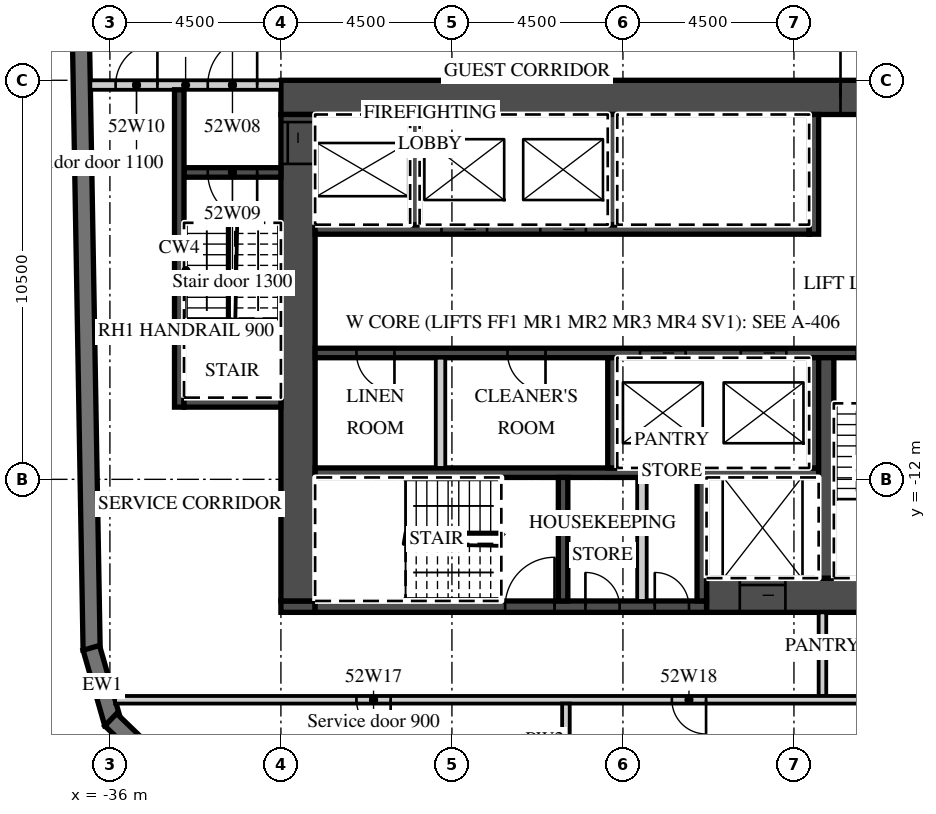
"""IFC4 building model, lengths in metres.
Left out: names, types, materials, properties, quantities, classifications, styles, units other than length and angle.
Written with IfcOpenShell. Run it as: python <this file> out.ifc"""

import sys

from ifc_helpers import new_model, si_unit, direction, frame, frame_2d, origin, place, context, subcontext, project, spatial, polyline, rectangle, outline, extrude, element, fill, save


model = new_model("IFC4")
c1 = context("Model", 3, precision=1e-05, world=origin(), true_north=direction((0.0, 1.0)))
c2 = subcontext(c1, "Body", "Model", "MODEL_VIEW")
j1 = project(units=[si_unit("LENGTHUNIT", "METRE"), si_unit("PLANEANGLEUNIT", "RADIAN")], contexts=[c1])
p1 = place(None, origin())
s1 = spatial("IfcSite", under=j1, at=p1, CompositionType="ELEMENT")
p2 = place(p1, origin())
s2 = spatial("IfcBuilding", under=s1, at=p2, CompositionType="ELEMENT")
p3 = place(p2, frame((0.0, 0.0, 217.7)))
s3 = spatial("IfcBuildingStorey", under=s2, at=p3, CompositionType="ELEMENT", Elevation=217.7)
p4 = place(p3, frame((-37.057, 16.503, 0.0), z_axis=(0.0, 0.0, 1.0), x_axis=(0.017452279857, -0.999847697366, 0.0)))
e1 = element("IfcWall", 1, at=p4, inside=s3, PredefinedType="SOLIDWALL", context=c2, shape_type="SweptSolid", body=[
    extrude(rectangle(XDim=33.0, YDim=0.45, at=frame_2d((16.5, 0.0))), origin(), (0.0, 0.0, 1.0), 3.02),
])
p5 = place(p3, frame((-36.49, -16.434, 0.0), z_axis=(0.0, 0.0, 1.0), x_axis=(0.275577603096, -0.961278827745, 0.0)))
e2 = element("IfcWall", 2, at=p5, inside=s3, PredefinedType="SOLIDWALL", context=c2, shape_type="SweptSolid", body=[
    extrude(outline(polyline([(0.0, -0.225), (2.071, -0.225), (1.95, 0.225), (0.121, 0.225), (0.0, -0.225)])), origin(), (0.0, 0.0, 1.0), 3.02),
])
p6 = place(p3, frame((-35.979, -18.324, 0.0), z_axis=(0.0, 0.0, 1.0), x_axis=(0.719320193998, -0.694678672846, 0.0)))
e3 = element("IfcWall", 3, at=p6, inside=s3, PredefinedType="SOLIDWALL", context=c2, shape_type="SweptSolid", body=[
    extrude(outline(polyline([(0.0, -0.225), (2.071, -0.225), (1.95, 0.225), (0.121, 0.225), (0.0, -0.225)])), origin(), (0.0, 0.0, 1.0), 3.02),
])
p7 = place(p3, frame((-31.5, -1.95, 0.0), z_axis=(0.0, 0.0, 1.0), x_axis=(1.0, 0.0, 0.0)))
e4 = element("IfcWall", 4, at=p7, inside=s3, PredefinedType="SHEAR", context=c2, shape_type="SweptSolid", body=[
    extrude(rectangle(XDim=18.0, YDim=0.9, at=frame_2d((9.0, 0.0))), origin(), (0.0, 0.0, 1.0), 3.02),
])
p8 = place(p7, frame((14.725, 0.0, 0.0)))
e5 = element("IfcOpeningElement", 5, at=p8, cuts=e4, PredefinedType="OPENING", context=c2, shape_type="SweptSolid", body=[
    extrude(rectangle(XDim=1.8, YDim=2.1, at=frame_2d((0.9, 1.05))), frame((0.0, 0.46, 0.0), z_axis=(0.0, -1.0, 0.0), x_axis=(1.0, 0.0, 0.0)), (0.0, 0.0, 1.0), 0.92),
])
p9 = place(p3, frame((-20.3, -15.05, 0.0), z_axis=(0.0, 0.0, 1.0), x_axis=(1.0, 0.0, 0.0)))
e6 = element("IfcWall", 6, at=p9, inside=s3, PredefinedType="SHEAR", context=c2, shape_type="SweptSolid", body=[
    extrude(rectangle(XDim=6.8, YDim=0.9, at=frame_2d((3.4, 0.0))), origin(), (0.0, 0.0, 1.0), 3.02),
])
p10 = place(p9, frame((0.875, 0.0, 0.0)))
e7 = element("IfcOpeningElement", 7, at=p10, cuts=e6, PredefinedType="OPENING", context=c2, shape_type="SweptSolid", body=[
    extrude(rectangle(XDim=1.2, YDim=2.1, at=frame_2d((0.6, 1.05))), frame((0.0, 0.46, 0.0), z_axis=(0.0, -1.0, 0.0), x_axis=(1.0, 0.0, 0.0)), (0.0, 0.0, 1.0), 0.92),
])
p11 = place(p3, frame((-31.5, -15.35, 0.0), z_axis=(0.0, 0.0, 1.0), x_axis=(1.0, 0.0, 0.0)))
e8 = element("IfcWall", 8, at=p11, inside=s3, PredefinedType="SHEAR", context=c2, shape_type="SweptSolid", body=[
    extrude(rectangle(XDim=0.9, YDim=0.3, at=frame_2d((0.45, 0.0))), origin(), (0.0, 0.0, 1.0), 3.02),
])
p12 = place(p3, frame((-30.6, -15.35, 0.0), z_axis=(0.0, 0.0, 1.0), x_axis=(1.0, 0.0, 0.0)))
e9 = element("IfcWall", 9, at=p12, inside=s3, PredefinedType="SHEAR", context=c2, shape_type="SweptSolid", body=[
    extrude(rectangle(XDim=10.3, YDim=0.3, at=frame_2d((5.15, 0.0))), origin(), (0.0, 0.0, 1.0), 3.02),
])
p13 = place(p12, frame((5.0, 0.0, 0.0)))
e10 = element("IfcOpeningElement", 10, at=p13, cuts=e9, PredefinedType="OPENING", context=c2, shape_type="SweptSolid", body=[
    extrude(rectangle(XDim=1.3, YDim=2.1, at=frame_2d((0.65, 1.05))), frame((0.0, 0.16, 0.0), z_axis=(0.0, -1.0, 0.0), x_axis=(1.0, 0.0, 0.0)), (0.0, 0.0, 1.0), 0.32),
])
p14 = place(p12, frame((7.113, 0.0, 0.0)))
e11 = element("IfcOpeningElement", 11, at=p14, cuts=e9, PredefinedType="OPENING", context=c2, shape_type="SweptSolid", body=[
    extrude(rectangle(XDim=0.9, YDim=2.1, at=frame_2d((0.45, 1.05))), frame((0.0, 0.16, 0.0), z_axis=(0.0, -1.0, 0.0), x_axis=(1.0, 0.0, 0.0)), (0.0, 0.0, 1.0), 0.32),
])
p15 = place(p12, frame((8.938, 0.0, 0.0)))
e12 = element("IfcOpeningElement", 12, at=p15, cuts=e9, PredefinedType="OPENING", context=c2, shape_type="SweptSolid", body=[
    extrude(rectangle(XDim=0.9, YDim=2.1, at=frame_2d((0.45, 1.05))), frame((0.0, 0.16, 0.0), z_axis=(0.0, -1.0, 0.0), x_axis=(1.0, 0.0, 0.0)), (0.0, 0.0, 1.0), 0.32),
])
p16 = place(p3, frame((-31.05, -15.2, 0.0), z_axis=(0.0, 0.0, 1.0), x_axis=(0.0, 1.0, 0.0)))
e13 = element("IfcWall", 13, at=p16, inside=s3, PredefinedType="SHEAR", context=c2, shape_type="SweptSolid", body=[
    extrude(rectangle(XDim=12.8, YDim=0.9, at=frame_2d((6.4, 0.0))), origin(), (0.0, 0.0, 1.0), 3.02),
])
p17 = place(p16, frame((11.5, 0.0, 0.0)))
e14 = element("IfcOpeningElement", 14, at=p17, cuts=e13, PredefinedType="OPENING", context=c2, shape_type="SweptSolid", body=[
    extrude(rectangle(XDim=1.1, YDim=2.1, at=frame_2d((0.55, 1.05))), frame((0.0, 0.46, 0.0), z_axis=(0.0, -1.0, 0.0), x_axis=(1.0, 0.0, 0.0)), (0.0, 0.0, 1.0), 0.92),
])
p18 = place(p3, frame((-30.6, -5.425, 0.0), z_axis=(0.0, 0.0, 1.0), x_axis=(1.0, 0.0, 0.0)))
e15 = element("IfcWall", 15, at=p18, inside=s3, PredefinedType="SHEAR", context=c2, shape_type="SweptSolid", body=[
    extrude(rectangle(XDim=13.0, YDim=0.25, at=frame_2d((6.5, 0.0))), origin(), (0.0, 0.0, 1.0), 3.02),
])
p19 = place(p18, frame((3.325, 0.0, 0.0)))
e16 = element("IfcOpeningElement", 16, at=p19, cuts=e15, PredefinedType="OPENING", context=c2, shape_type="SweptSolid", body=[
    extrude(rectangle(XDim=1.2, YDim=2.1, at=frame_2d((0.6, 1.05))), frame((0.0, 0.135, 0.0), z_axis=(0.0, -1.0, 0.0), x_axis=(1.0, 0.0, 0.0)), (0.0, 0.0, 1.0), 0.27),
])
p20 = place(p18, frame((5.925, 0.0, 0.0)))
e17 = element("IfcOpeningElement", 17, at=p20, cuts=e15, PredefinedType="OPENING", context=c2, shape_type="SweptSolid", body=[
    extrude(rectangle(XDim=1.2, YDim=2.1, at=frame_2d((0.6, 1.05))), frame((0.0, 0.135, 0.0), z_axis=(0.0, -1.0, 0.0), x_axis=(1.0, 0.0, 0.0)), (0.0, 0.0, 1.0), 0.27),
])
p21 = place(p3, frame((-17.475, -5.55, 0.0), z_axis=(0.0, 0.0, 1.0), x_axis=(0.0, 1.0, 0.0)))
e18 = element("IfcWall", 18, at=p21, inside=s3, PredefinedType="SHEAR", context=c2, shape_type="SweptSolid", body=[
    extrude(rectangle(XDim=3.15, YDim=0.25, at=frame_2d((1.575, 0.0))), origin(), (0.0, 0.0, 1.0), 3.02),
])
for number, where, z_axis, x_axis in (
    (19, (-27.975, -5.3, 0.0), (0.0, 0.0, 1.0), (0.0, 1.0, 0.0)),
    (20, (-22.775, -5.3, 0.0), (0.0, 0.0, 1.0), (0.0, 1.0, 0.0)),
):
    element("IfcWall", number, at=place(p3, frame(where, z_axis=z_axis, x_axis=x_axis)), inside=s3, PredefinedType="SHEAR", context=c2, shape_type="SweptSolid", body=[
        extrude(rectangle(XDim=2.9, YDim=0.25, at=frame_2d((1.45, 0.0))), origin(), (0.0, 0.0, 1.0), 3.02),
    ])
p22 = place(p3, frame((-30.6, -8.675, 0.0), z_axis=(0.0, 0.0, 1.0), x_axis=(1.0, 0.0, 0.0)))
e21 = element("IfcWall", 21, at=p22, inside=s3, PredefinedType="SHEAR", context=c2, shape_type="SweptSolid", body=[
    extrude(rectangle(XDim=16.2, YDim=0.25, at=frame_2d((8.1, 0.0))), origin(), (0.0, 0.0, 1.0), 3.02),
])
p23 = place(p22, frame((8.55, 0.0, 0.0)))
e22 = element("IfcOpeningElement", 22, at=p23, cuts=e21, PredefinedType="OPENING", context=c2, shape_type="SweptSolid", body=[
    extrude(rectangle(XDim=1.2, YDim=2.1, at=frame_2d((0.6, 1.05))), frame((0.0, 0.135, 0.0), z_axis=(0.0, -1.0, 0.0), x_axis=(1.0, 0.0, 0.0)), (0.0, 0.0, 1.0), 0.27),
])
p24 = place(p22, frame((11.2, 0.0, 0.0)))
e23 = element("IfcOpeningElement", 23, at=p24, cuts=e21, PredefinedType="OPENING", context=c2, shape_type="SweptSolid", body=[
    extrude(rectangle(XDim=1.2, YDim=2.1, at=frame_2d((0.6, 1.05))), frame((0.0, 0.135, 0.0), z_axis=(0.0, -1.0, 0.0), x_axis=(1.0, 0.0, 0.0)), (0.0, 0.0, 1.0), 0.27),
])
p25 = place(p22, frame((14.25, 0.0, 0.0)))
e24 = element("IfcOpeningElement", 24, at=p25, cuts=e21, PredefinedType="OPENING", context=c2, shape_type="SweptSolid", body=[
    extrude(rectangle(XDim=1.3, YDim=2.1, at=frame_2d((0.65, 1.05))), frame((0.0, 0.135, 0.0), z_axis=(0.0, -1.0, 0.0), x_axis=(1.0, 0.0, 0.0)), (0.0, 0.0, 1.0), 0.27),
])
p26 = place(p22, frame((1.087, 0.0, 0.0)))
e25 = element("IfcOpeningElement", 25, at=p26, cuts=e21, PredefinedType="OPENING", context=c2, shape_type="SweptSolid", body=[
    extrude(rectangle(XDim=1.0, YDim=2.1, at=frame_2d((0.5, 1.05))), frame((0.0, 0.135, 0.0), z_axis=(0.0, -1.0, 0.0), x_axis=(1.0, 0.0, 0.0)), (0.0, 0.0, 1.0), 0.27),
])
p27 = place(p22, frame((5.062, 0.0, 0.0)))
e26 = element("IfcOpeningElement", 26, at=p27, cuts=e21, PredefinedType="OPENING", context=c2, shape_type="SweptSolid", body=[
    extrude(rectangle(XDim=1.0, YDim=2.1, at=frame_2d((0.5, 1.05))), frame((0.0, 0.135, 0.0), z_axis=(0.0, -1.0, 0.0), x_axis=(1.0, 0.0, 0.0)), (0.0, 0.0, 1.0), 0.27),
])
p28 = place(p3, frame((-30.6, -11.825, 0.0), z_axis=(0.0, 0.0, 1.0), x_axis=(1.0, 0.0, 0.0)))
e27 = element("IfcWall", 27, at=p28, inside=s3, PredefinedType="SHEAR", context=c2, shape_type="SweptSolid", body=[
    extrude(rectangle(XDim=13.25, YDim=0.25, at=frame_2d((6.625, 0.0))), origin(), (0.0, 0.0, 1.0), 3.02),
])
for number, where, z_axis, x_axis in (
    (28, (-17.475, -11.7, 0.0), (0.0, 0.0, 1.0), (0.0, 1.0, 0.0)),
    (29, (-22.775, -11.7, 0.0), (0.0, 0.0, 1.0), (0.0, 1.0, 0.0)),
):
    element("IfcWall", number, at=place(p3, frame(where, z_axis=z_axis, x_axis=x_axis)), inside=s3, PredefinedType="SHEAR", context=c2, shape_type="SweptSolid", body=[
        extrude(rectangle(XDim=2.9, YDim=0.25, at=frame_2d((1.45, 0.0))), origin(), (0.0, 0.0, 1.0), 3.02),
    ])
p29 = place(p3, frame((-27.3, -11.7, 0.0), z_axis=(0.0, 0.0, 1.0), x_axis=(0.0, 1.0, 0.0)))
e30 = element("IfcWall", 30, at=p29, inside=s3, PredefinedType="PARTITIONING", context=c2, shape_type="SweptSolid", body=[
    extrude(rectangle(XDim=2.9, YDim=0.25, at=frame_2d((1.45, 0.0))), origin(), (0.0, 0.0, 1.0), 3.02),
])
p30 = place(p3, frame((-17.15, -14.6, 0.0), z_axis=(0.0, 0.0, 1.0), x_axis=(0.0, 1.0, 0.0)))
e31 = element("IfcWall", 31, at=p30, inside=s3, PredefinedType="SHEAR", context=c2, shape_type="SweptSolid", body=[
    extrude(rectangle(XDim=5.8, YDim=0.4, at=frame_2d((2.9, 0.0))), origin(), (0.0, 0.0, 1.0), 3.02),
])
for number, where, z_axis, x_axis in (
    (32, (-20.425, -15.2, 0.0), (0.0, 0.0, 1.0), (0.0, 1.0, 0.0)),
    (33, (-24.075, -15.2, 0.0), (0.0, 0.0, 1.0), (0.0, 1.0, 0.0)),
):
    element("IfcWall", number, at=place(p3, frame(where, z_axis=z_axis, x_axis=x_axis)), inside=s3, PredefinedType="SHEAR", context=c2, shape_type="SweptSolid", body=[
        extrude(rectangle(XDim=3.25, YDim=0.25, at=frame_2d((1.625, 0.0))), origin(), (0.0, 0.0, 1.0), 3.02),
    ])
p31 = place(p3, frame((-22.0, -15.2, 0.0), z_axis=(0.0, 0.0, 1.0), x_axis=(0.0, 1.0, 0.0)))
e34 = element("IfcWall", 34, at=p31, inside=s3, PredefinedType="PARTITIONING", context=c2, shape_type="SweptSolid", body=[
    extrude(rectangle(XDim=3.25, YDim=0.25, at=frame_2d((1.625, 0.0))), origin(), (0.0, 0.0, 1.0), 3.02),
])
p32 = place(p3, frame((-36.515, -1.625, 0.0), z_axis=(0.0, 0.0, 1.0), x_axis=(1.0, 0.0, 0.0)))
e35 = element("IfcWall", 35, at=p32, inside=s3, PredefinedType="PARTITIONING", context=c2, shape_type="SweptSolid", body=[
    extrude(rectangle(XDim=5.015, YDim=0.25, at=frame_2d((2.508, 0.0))), origin(), (0.0, 0.0, 1.0), 3.02),
])
p33 = place(p32, frame((3.09, 0.0, 0.0)))
e36 = element("IfcOpeningElement", 36, at=p33, cuts=e35, PredefinedType="OPENING", context=c2, shape_type="SweptSolid", body=[
    extrude(rectangle(XDim=1.3, YDim=2.1, at=frame_2d((0.65, 1.05))), frame((0.0, 0.135, 0.0), z_axis=(0.0, -1.0, 0.0), x_axis=(1.0, 0.0, 0.0)), (0.0, 0.0, 1.0), 0.27),
])
p34 = place(p32, frame((0.665, 0.0, 0.0)))
e37 = element("IfcOpeningElement", 37, at=p34, cuts=e35, PredefinedType="OPENING", context=c2, shape_type="SweptSolid", body=[
    extrude(rectangle(XDim=1.1, YDim=2.1, at=frame_2d((0.55, 1.05))), frame((0.0, 0.135, 0.0), z_axis=(0.0, -1.0, 0.0), x_axis=(1.0, 0.0, 0.0)), (0.0, 0.0, 1.0), 0.27),
])
p35 = place(p3, frame((-34.05, -3.925, 0.0), z_axis=(0.0, 0.0, 1.0), x_axis=(1.0, 0.0, 0.0)))
e38 = element("IfcWall", 38, at=p35, inside=s3, PredefinedType="SHEAR", context=c2, shape_type="SweptSolid", body=[
    extrude(rectangle(XDim=2.55, YDim=0.25, at=frame_2d((1.275, 0.0))), origin(), (0.0, 0.0, 1.0), 3.02),
])
p36 = place(p35, frame((0.625, 0.0, 0.0)))
e39 = element("IfcOpeningElement", 39, at=p36, cuts=e38, PredefinedType="OPENING", context=c2, shape_type="SweptSolid", body=[
    extrude(rectangle(XDim=1.3, YDim=2.1, at=frame_2d((0.65, 1.05))), frame((0.0, 0.135, 0.0), z_axis=(0.0, -1.0, 0.0), x_axis=(1.0, 0.0, 0.0)), (0.0, 0.0, 1.0), 0.27),
])
p37 = place(p3, frame((-34.175, -10.1, 0.0), z_axis=(0.0, 0.0, 1.0), x_axis=(0.0, 1.0, 0.0)))
e40 = element("IfcWall", 40, at=p37, inside=s3, PredefinedType="SHEAR", context=c2, shape_type="SweptSolid", body=[
    extrude(rectangle(XDim=8.35, YDim=0.25, at=frame_2d((4.175, 0.0))), origin(), (0.0, 0.0, 1.0), 3.02),
])
p38 = place(p3, frame((-34.05, -9.975, 0.0), z_axis=(0.0, 0.0, 1.0), x_axis=(1.0, 0.0, 0.0)))
e41 = element("IfcWall", 41, at=p38, inside=s3, PredefinedType="SHEAR", context=c2, shape_type="SweptSolid", body=[
    extrude(rectangle(XDim=2.55, YDim=0.25, at=frame_2d((1.275, 0.0))), origin(), (0.0, 0.0, 1.0), 3.02),
])
p39 = place(p3, frame((-17.25, -17.7, 0.0), z_axis=(0.0, 0.0, 1.0), x_axis=(0.0, 1.0, 0.0)))
e42 = element("IfcWall", 42, at=p39, inside=s3, PredefinedType="PARTITIONING", context=c2, shape_type="SweptSolid", body=[
    extrude(rectangle(XDim=2.2, YDim=0.2, at=frame_2d((1.1, 0.0))), origin(), (0.0, 0.0, 1.0), 3.02),
])
p40 = place(p3, frame((-35.864, -17.8, 0.0), z_axis=(0.0, 0.0, 1.0), x_axis=(1.0, 0.0, 0.0)))
e43 = element("IfcWall", 43, at=p40, inside=s3, PredefinedType="PARTITIONING", context=c2, shape_type="SweptSolid", body=[
    extrude(rectangle(XDim=22.264, YDim=0.2, at=frame_2d((11.132, 0.0))), origin(), (0.0, 0.0, 1.0), 3.02),
])
p41 = place(p40, frame((6.351, 0.0, 0.0)))
e44 = element("IfcOpeningElement", 44, at=p41, cuts=e43, PredefinedType="OPENING", context=c2, shape_type="SweptSolid", body=[
    extrude(rectangle(XDim=0.9, YDim=2.1, at=frame_2d((0.45, 1.05))), frame((0.0, 0.11, 0.0), z_axis=(0.0, -1.0, 0.0), x_axis=(1.0, 0.0, 0.0)), (0.0, 0.0, 1.0), 0.22),
])
p42 = place(p40, frame((14.651, 0.0, 0.0)))
e45 = element("IfcOpeningElement", 45, at=p42, cuts=e43, PredefinedType="OPENING", context=c2, shape_type="SweptSolid", body=[
    extrude(rectangle(XDim=0.9, YDim=2.1, at=frame_2d((0.45, 1.05))), frame((0.0, 0.11, 0.0), z_axis=(0.0, -1.0, 0.0), x_axis=(1.0, 0.0, 0.0)), (0.0, 0.0, 1.0), 0.22),
])
p43 = place(p3, frame((-24.0, -19.824, 0.0), z_axis=(0.0, 0.0, 1.0), x_axis=(0.0, 1.0, 0.0)))
e46 = element("IfcWall", 46, at=p43, inside=s3, PredefinedType="PARTITIONING", context=c2, shape_type="SweptSolid", body=[
    extrude(rectangle(XDim=1.925, YDim=0.2, at=frame_2d((0.962, 0.0))), origin(), (0.0, 0.0, 1.0), 3.02),
])
p44 = place(p23, origin())
e47 = element("IfcDoor", 47, at=p44, inside=s3, OperationType="SLIDING_TO_LEFT", PredefinedType="DOOR", context=c2, shape_type="SweptSolid", body=[
    extrude(rectangle(XDim=1.2, YDim=2.1, at=frame_2d((0.6, 1.05))), frame((0.0, 0.025, 0.0), z_axis=(0.0, -1.0, 0.0), x_axis=(1.0, 0.0, 0.0)), (0.0, 0.0, 1.0), 0.05),
])
fill(e22, e47)
p45 = place(p24, origin())
e48 = element("IfcDoor", 48, at=p45, inside=s3, OperationType="SLIDING_TO_RIGHT", PredefinedType="DOOR", context=c2, shape_type="SweptSolid", body=[
    extrude(rectangle(XDim=1.2, YDim=2.1, at=frame_2d((0.6, 1.05))), frame((0.0, 0.025, 0.0), z_axis=(0.0, -1.0, 0.0), x_axis=(1.0, 0.0, 0.0)), (0.0, 0.0, 1.0), 0.05),
])
fill(e23, e48)
p46 = place(p19, origin())
e49 = element("IfcDoor", 49, at=p46, inside=s3, OperationType="SLIDING_TO_RIGHT", PredefinedType="DOOR", context=c2, shape_type="SweptSolid", body=[
    extrude(rectangle(XDim=1.2, YDim=2.1, at=frame_2d((0.6, 1.05))), frame((0.0, 0.025, 0.0), z_axis=(0.0, -1.0, 0.0), x_axis=(1.0, 0.0, 0.0)), (0.0, 0.0, 1.0), 0.05),
])
fill(e16, e49)
p47 = place(p20, origin())
e50 = element("IfcDoor", 50, at=p47, inside=s3, OperationType="SLIDING_TO_RIGHT", PredefinedType="DOOR", context=c2, shape_type="SweptSolid", body=[
    extrude(rectangle(XDim=1.2, YDim=2.1, at=frame_2d((0.6, 1.05))), frame((0.0, 0.025, 0.0), z_axis=(0.0, -1.0, 0.0), x_axis=(1.0, 0.0, 0.0)), (0.0, 0.0, 1.0), 0.05),
])
fill(e17, e50)
p48 = place(p10, origin())
e51 = element("IfcDoor", 51, at=p48, inside=s3, OperationType="SLIDING_TO_LEFT", PredefinedType="DOOR", context=c2, shape_type="SweptSolid", body=[
    extrude(rectangle(XDim=1.2, YDim=2.1, at=frame_2d((0.6, 1.05))), frame((0.0, 0.025, 0.0), z_axis=(0.0, -1.0, 0.0), x_axis=(1.0, 0.0, 0.0)), (0.0, 0.0, 1.0), 0.05),
])
fill(e7, e51)
p49 = place(p17, origin())
e52 = element("IfcDoor", 52, at=p49, inside=s3, OperationType="SLIDING_TO_RIGHT", PredefinedType="DOOR", context=c2, shape_type="SweptSolid", body=[
    extrude(rectangle(XDim=1.1, YDim=2.1, at=frame_2d((0.55, 1.05))), frame((0.0, 0.025, 0.0), z_axis=(0.0, -1.0, 0.0), x_axis=(1.0, 0.0, 0.0)), (0.0, 0.0, 1.0), 0.05),
])
fill(e14, e52)
p50 = place(p8, origin())
e53 = element("IfcDoor", 53, at=p50, inside=s3, OperationType="DOUBLE_DOOR_DOUBLE_SWING", PredefinedType="DOOR", context=c2, shape_type="SweptSolid", body=[
    extrude(rectangle(XDim=1.8, YDim=2.1, at=frame_2d((0.9, 1.05))), frame((0.0, 0.025, 0.0), z_axis=(0.0, -1.0, 0.0), x_axis=(1.0, 0.0, 0.0)), (0.0, 0.0, 1.0), 0.05),
])
fill(e5, e53)
p51 = place(p33, origin())
e54 = element("IfcDoor", 54, at=p51, inside=s3, OperationType="SINGLE_SWING_RIGHT", PredefinedType="DOOR", context=c2, shape_type="SweptSolid", body=[
    extrude(rectangle(XDim=1.3, YDim=2.1, at=frame_2d((0.65, 1.05))), frame((0.0, 0.025, 0.0), z_axis=(0.0, -1.0, 0.0), x_axis=(1.0, 0.0, 0.0)), (0.0, 0.0, 1.0), 0.05),
])
fill(e36, e54)
p52 = place(p36, origin())
e55 = element("IfcDoor", 55, at=p52, inside=s3, OperationType="SINGLE_SWING_RIGHT", PredefinedType="DOOR", context=c2, shape_type="SweptSolid", body=[
    extrude(rectangle(XDim=1.3, YDim=2.1, at=frame_2d((0.65, 1.05))), frame((0.0, 0.025, 0.0), z_axis=(0.0, -1.0, 0.0), x_axis=(1.0, 0.0, 0.0)), (0.0, 0.0, 1.0), 0.05),
])
fill(e39, e55)
p53 = place(p34, origin())
e56 = element("IfcDoor", 56, at=p53, inside=s3, OperationType="SINGLE_SWING_RIGHT", PredefinedType="DOOR", context=c2, shape_type="SweptSolid", body=[
    extrude(rectangle(XDim=1.1, YDim=2.1, at=frame_2d((0.55, 1.05))), frame((0.0, 0.025, 0.0), z_axis=(0.0, -1.0, 0.0), x_axis=(1.0, 0.0, 0.0)), (0.0, 0.0, 1.0), 0.05),
])
fill(e37, e56)
p54 = place(p25, origin())
e57 = element("IfcDoor", 57, at=p54, inside=s3, OperationType="SINGLE_SWING_RIGHT", PredefinedType="DOOR", context=c2, shape_type="SweptSolid", body=[
    extrude(rectangle(XDim=1.3, YDim=2.1, at=frame_2d((0.65, 1.05))), frame((0.0, 0.025, 0.0), z_axis=(0.0, -1.0, 0.0), x_axis=(1.0, 0.0, 0.0)), (0.0, 0.0, 1.0), 0.05),
])
fill(e24, e57)
p55 = place(p13, origin())
e58 = element("IfcDoor", 58, at=p55, inside=s3, OperationType="SINGLE_SWING_RIGHT", PredefinedType="DOOR", context=c2, shape_type="SweptSolid", body=[
    extrude(rectangle(XDim=1.3, YDim=2.1, at=frame_2d((0.65, 1.05))), frame((0.0, 0.025, 0.0), z_axis=(0.0, -1.0, 0.0), x_axis=(1.0, 0.0, 0.0)), (0.0, 0.0, 1.0), 0.05),
])
fill(e10, e58)
p56 = place(p14, origin())
e59 = element("IfcDoor", 59, at=p56, inside=s3, OperationType="SINGLE_SWING_LEFT", PredefinedType="DOOR", context=c2, shape_type="SweptSolid", body=[
    extrude(rectangle(XDim=0.9, YDim=2.1, at=frame_2d((0.45, 1.05))), frame((0.0, 0.025, 0.0), z_axis=(0.0, -1.0, 0.0), x_axis=(1.0, 0.0, 0.0)), (0.0, 0.0, 1.0), 0.05),
])
fill(e11, e59)
p57 = place(p15, origin())
e60 = element("IfcDoor", 60, at=p57, inside=s3, OperationType="SINGLE_SWING_LEFT", PredefinedType="DOOR", context=c2, shape_type="SweptSolid", body=[
    extrude(rectangle(XDim=0.9, YDim=2.1, at=frame_2d((0.45, 1.05))), frame((0.0, 0.025, 0.0), z_axis=(0.0, -1.0, 0.0), x_axis=(1.0, 0.0, 0.0)), (0.0, 0.0, 1.0), 0.05),
])
fill(e12, e60)
p58 = place(p26, origin())
e61 = element("IfcDoor", 61, at=p58, inside=s3, OperationType="SINGLE_SWING_RIGHT", PredefinedType="DOOR", context=c2, shape_type="SweptSolid", body=[
    extrude(rectangle(XDim=1.0, YDim=2.1, at=frame_2d((0.5, 1.05))), frame((0.0, 0.025, 0.0), z_axis=(0.0, -1.0, 0.0), x_axis=(1.0, 0.0, 0.0)), (0.0, 0.0, 1.0), 0.05),
])
fill(e25, e61)
p59 = place(p27, origin())
e62 = element("IfcDoor", 62, at=p59, inside=s3, OperationType="SINGLE_SWING_RIGHT", PredefinedType="DOOR", context=c2, shape_type="SweptSolid", body=[
    extrude(rectangle(XDim=1.0, YDim=2.1, at=frame_2d((0.5, 1.05))), frame((0.0, 0.025, 0.0), z_axis=(0.0, -1.0, 0.0), x_axis=(1.0, 0.0, 0.0)), (0.0, 0.0, 1.0), 0.05),
])
fill(e26, e62)
p60 = place(p41, origin())
e63 = element("IfcDoor", 63, at=p60, inside=s3, OperationType="SINGLE_SWING_RIGHT", PredefinedType="DOOR", context=c2, shape_type="SweptSolid", body=[
    extrude(rectangle(XDim=0.9, YDim=2.1, at=frame_2d((0.45, 1.05))), frame((0.0, 0.025, 0.0), z_axis=(0.0, -1.0, 0.0), x_axis=(1.0, 0.0, 0.0)), (0.0, 0.0, 1.0), 0.05),
])
fill(e44, e63)
p61 = place(p42, origin())
e64 = element("IfcDoor", 64, at=p61, inside=s3, OperationType="SINGLE_SWING_RIGHT", PredefinedType="DOOR", context=c2, shape_type="SweptSolid", body=[
    extrude(rectangle(XDim=0.9, YDim=2.1, at=frame_2d((0.45, 1.05))), frame((0.0, 0.025, 0.0), z_axis=(0.0, -1.0, 0.0), x_axis=(1.0, 0.0, 0.0)), (0.0, 0.0, 1.0), 0.05),
])
fill(e45, e64)
save(model, sys.argv[1])
